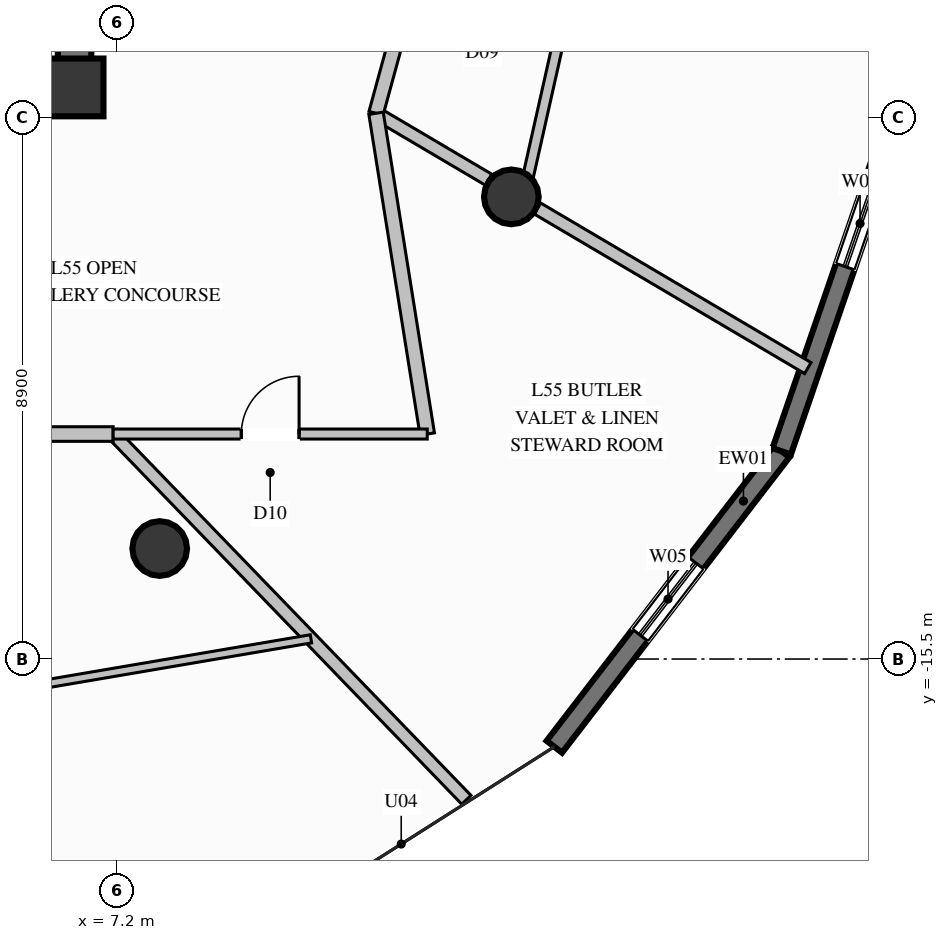
"""IFC4 building model, lengths in metres.
Left out: names, types, materials, properties, quantities, classifications, styles, units other than length and angle.
Written with IfcOpenShell. Run it as: python <this file> out.ifc"""

import sys

from ifc_helpers import new_model, si_unit, direction, frame, frame_2d, origin, origin_2d, place, context, subcontext, project, spatial, rectangle, circle, extrude, element, fill, save


model = new_model("IFC4")
c1 = context("Model", 3, precision=1e-05, world=origin(), true_north=direction((0.0, 1.0)))
c2 = subcontext(c1, "Body", "Model", "MODEL_VIEW")
j1 = project(units=[si_unit("LENGTHUNIT", "METRE"), si_unit("PLANEANGLEUNIT", "RADIAN")], contexts=[c1])
p1 = place(None, origin())
s1 = spatial("IfcSite", under=j1, at=p1, CompositionType="ELEMENT")
p2 = place(p1, origin())
s2 = spatial("IfcBuilding", under=s1, at=p2, CompositionType="ELEMENT")
p3 = place(p2, frame((0.0, 0.0, 212.8)))
s3 = spatial("IfcBuildingStorey", under=s2, at=p3, CompositionType="ELEMENT", Elevation=212.8)
p4 = place(p3, frame((6.5, -6.1, 0.0), z_axis=(0.0, 0.0, 1.0), x_axis=(1.0, 0.0, 0.0)))
e1 = element("IfcColumn", 1, at=p4, inside=s3, PredefinedType="COLUMN", context=c2, shape_type="SweptSolid", body=[
    extrude(rectangle(XDim=0.95, YDim=0.95, at=origin_2d()), origin(), (0.0, 0.0, 1.0), 3.6),
])
p5 = place(p3, frame((4.15, -6.1, 0.0), z_axis=(0.0, 0.0, 1.0), x_axis=(1.0, 0.0, 0.0)))
e2 = element("IfcWall", 2, at=p5, inside=s3, PredefinedType="SHEAR", context=c2, shape_type="SweptSolid", body=[
    extrude(rectangle(XDim=2.075, YDim=0.55, at=frame_2d((1.038, 0.0))), origin(), (0.0, 0.0, 1.0), 3.6),
])
p6 = place(p3, frame((6.5, -6.375, 0.0), z_axis=(0.0, 0.0, 1.0), x_axis=(0.0, 1.0, 0.0)))
e3 = element("IfcWall", 3, at=p6, inside=s3, PredefinedType="SHEAR", context=c2, shape_type="SweptSolid", body=[
    extrude(rectangle(XDim=4.025, YDim=0.55, at=frame_2d((2.012, 0.0))), origin(), (0.0, 0.0, 1.0), 3.6),
])
for number, where, z_axis, x_axis in (
    (4, (7.9, -13.683, 0.0), (0.0, 0.0, 1.0), (1.0, 0.0, 0.0)),
    (5, (13.683, -7.9, 0.0), (0.0, 0.0, 1.0), (1.0, 0.0, 0.0)),
):
    element("IfcColumn", number, at=place(p3, frame(where, z_axis=z_axis, x_axis=x_axis)), inside=s3, PredefinedType="COLUMN", context=c2, shape_type="SweptSolid", body=[
        extrude(circle(Radius=0.45, at=origin_2d()), origin(), (0.0, 0.0, 1.0), 3.6),
    ])
p7 = place(p3, frame((18.13, -12.084, 0.0), z_axis=(0.0, 0.0, 1.0), x_axis=(-0.609935864866, -0.79245078128, 0.0)))
e6 = element("IfcWall", 6, at=p7, inside=s3, PredefinedType="SOLIDWALL", context=c2, shape_type="SweptSolid", body=[
    extrude(rectangle(XDim=6.132, YDim=0.32, at=frame_2d((3.066, 0.0))), origin(), (0.0, 0.0, 1.0), 3.36),
])
p8 = place(p7, frame((2.316, 0.0, 0.85)))
e7 = element("IfcOpeningElement", 7, at=p8, cuts=e6, PredefinedType="OPENING", context=c2, shape_type="SweptSolid", body=[
    extrude(rectangle(XDim=1.5, YDim=1.2, at=frame_2d((0.75, 0.6))), frame((0.0, 0.17, 0.0), z_axis=(0.0, -1.0, 0.0), x_axis=(1.0, 0.0, 0.0)), (0.0, 0.0, 1.0), 0.34),
])
p9 = place(p3, frame((20.208, -6.042, 0.0), z_axis=(0.0, 0.0, 1.0), x_axis=(-0.325246353844, -0.94562931919, 0.0)))
e8 = element("IfcWall", 8, at=p9, inside=s3, PredefinedType="SOLIDWALL", context=c2, shape_type="SweptSolid", body=[
    extrude(rectangle(XDim=6.389, YDim=0.32, at=frame_2d((3.195, 0.0))), origin(), (0.0, 0.0, 1.0), 3.36),
])
p10 = place(p9, frame((1.678, 0.0, 0.85)))
e9 = element("IfcOpeningElement", 9, at=p10, cuts=e8, PredefinedType="OPENING", context=c2, shape_type="SweptSolid", body=[
    extrude(rectangle(XDim=1.5, YDim=1.2, at=frame_2d((0.75, 0.6))), frame((0.0, 0.17, 0.0), z_axis=(0.0, -1.0, 0.0), x_axis=(1.0, 0.0, 0.0)), (0.0, 0.0, 1.0), 0.34),
])
p11 = place(p3, frame((11.458, -6.525, 0.0), z_axis=(0.0, 0.0, 1.0), x_axis=(0.86117076556, -0.508315760669, 0.0)))
e10 = element("IfcWall", 10, at=p11, inside=s3, PredefinedType="PARTITIONING", context=c2, shape_type="SweptSolid", body=[
    extrude(rectangle(XDim=2.148, YDim=0.21, at=frame_2d((1.074, 0.0))), origin(), (0.0, 0.0, 1.0), 2.876),
])
p12 = place(p3, frame((14.112, -8.091, 0.0), z_axis=(0.0, 0.0, 1.0), x_axis=(0.861245459465, -0.508189195626, 0.0)))
e11 = element("IfcWall", 11, at=p12, inside=s3, PredefinedType="PARTITIONING", context=c2, shape_type="SweptSolid", body=[
    extrude(rectangle(XDim=5.164, YDim=0.21, at=frame_2d((2.582, 0.0))), origin(), (0.0, 0.0, 1.0), 3.36),
])
p13 = place(p3, frame((11.458, -6.525, 0.0), z_axis=(0.0, 0.0, 1.0), x_axis=(0.263735174528, 0.964595126318, 0.0)))
e12 = element("IfcWall", 12, at=p13, inside=s3, PredefinedType="PARTITIONING", context=c2, shape_type="SweptSolid", body=[
    extrude(rectangle(XDim=2.775, YDim=0.24, at=frame_2d((1.388, 0.0))), origin(), (0.0, 0.0, 1.0), 3.36),
])
p14 = place(p3, frame((13.872, -7.95, 0.0), z_axis=(0.0, 0.0, 1.0), x_axis=(0.21927837601, 0.975662335962, 0.0)))
e13 = element("IfcWall", 13, at=p14, inside=s3, PredefinedType="PLUMBINGWALL", context=c2, shape_type="SweptSolid", body=[
    extrude(rectangle(XDim=3.379, YDim=0.175, at=frame_2d((1.689, 0.0))), origin(), (0.0, 0.0, 1.0), 2.929),
])
p15 = place(p3, frame((7.134, -11.8, 0.0), z_axis=(0.0, 0.0, 1.0), x_axis=(0.694693504574, -0.71930587006, 0.0)))
e14 = element("IfcWall", 14, at=p15, inside=s3, PredefinedType="PARTITIONING", context=c2, shape_type="SweptSolid", body=[
    extrude(rectangle(XDim=8.362, YDim=0.21, at=frame_2d((4.181, 0.0))), origin(), (0.0, 0.0, 1.0), 3.36),
])
p16 = place(p3, frame((0.0, -11.8, 0.0), z_axis=(0.0, 0.0, 1.0), x_axis=(1.0, 0.0, 0.0)))
e15 = element("IfcWall", 15, at=p16, inside=s3, PredefinedType="PARTITIONING", context=c2, shape_type="SweptSolid", body=[
    extrude(rectangle(XDim=7.134, YDim=0.24, at=frame_2d((3.567, 0.0))), origin(), (0.0, 0.0, 1.0), 3.36),
])
p17 = place(p3, frame((0.245, -16.893, 0.0), z_axis=(0.0, 0.0, 1.0), x_axis=(0.985840040351, 0.167688445755, 0.0)))
e16 = element("IfcWall", 16, at=p17, inside=s3, PredefinedType="PARTITIONING", context=c2, shape_type="SweptSolid", body=[
    extrude(rectangle(XDim=10.288, YDim=0.135, at=frame_2d((5.144, 0.0))), origin(), (0.0, 0.0, 1.0), 3.36),
])
p18 = place(p17, frame((4.669, 0.0, 0.0)))
e17 = element("IfcOpeningElement", 17, at=p18, cuts=e16, PredefinedType="OPENING", context=c2, shape_type="SweptSolid", body=[
    extrude(rectangle(XDim=0.95, YDim=2.1, at=frame_2d((0.475, 1.05))), frame((0.0, 0.078, 0.0), z_axis=(0.0, -1.0, 0.0), x_axis=(1.0, 0.0, 0.0)), (0.0, 0.0, 1.0), 0.155),
])
p19 = place(p3, frame((12.3, -11.8, 0.0), z_axis=(0.0, 0.0, 1.0), x_axis=(-0.157628647668, 0.987498460472, 0.0)))
e18 = element("IfcWall", 18, at=p19, inside=s3, PredefinedType="PARTITIONING", context=c2, shape_type="SweptSolid", body=[
    extrude(rectangle(XDim=5.342, YDim=0.24, at=frame_2d((2.671, 0.0))), origin(), (0.0, 0.0, 1.0), 3.36),
])
p20 = place(p3, frame((7.134, -11.8, 0.0), z_axis=(0.0, 0.0, 1.0), x_axis=(1.0, 0.0, 0.0)))
e19 = element("IfcWall", 19, at=p20, inside=s3, PredefinedType="PARTITIONING", context=c2, shape_type="SweptSolid", body=[
    extrude(rectangle(XDim=5.166, YDim=0.165, at=frame_2d((2.583, 0.0))), origin(), (0.0, 0.0, 1.0), 3.36),
])
p21 = place(p20, frame((2.108, 0.0, 0.0)))
e20 = element("IfcOpeningElement", 20, at=p21, cuts=e19, PredefinedType="OPENING", context=c2, shape_type="SweptSolid", body=[
    extrude(rectangle(XDim=0.95, YDim=2.1, at=frame_2d((0.475, 1.05))), frame((0.0, 0.093, 0.0), z_axis=(0.0, -1.0, 0.0), x_axis=(1.0, 0.0, 0.0)), (0.0, 0.0, 1.0), 0.185),
])
p22 = place(p8, origin())
e21 = element("IfcWindow", 21, at=p22, inside=s3, PartitioningType="SINGLE_PANEL", PredefinedType="WINDOW", context=c2, shape_type="SweptSolid", body=[
    extrude(rectangle(XDim=1.5, YDim=1.2, at=frame_2d((0.75, 0.6))), frame((0.0, 0.03, 0.0), z_axis=(0.0, -1.0, 0.0), x_axis=(1.0, 0.0, 0.0)), (0.0, 0.0, 1.0), 0.06),
])
fill(e7, e21)
p23 = place(p10, origin())
e22 = element("IfcWindow", 22, at=p23, inside=s3, PartitioningType="SINGLE_PANEL", PredefinedType="WINDOW", context=c2, shape_type="SweptSolid", body=[
    extrude(rectangle(XDim=1.5, YDim=1.2, at=frame_2d((0.75, 0.6))), frame((0.0, 0.03, 0.0), z_axis=(0.0, -1.0, 0.0), x_axis=(1.0, 0.0, 0.0)), (0.0, 0.0, 1.0), 0.06),
])
fill(e9, e22)
p24 = place(p21, origin())
e23 = element("IfcDoor", 23, at=p24, inside=s3, OperationType="SINGLE_SWING_RIGHT", PredefinedType="DOOR", context=c2, shape_type="SweptSolid", body=[
    extrude(rectangle(XDim=0.95, YDim=2.1, at=frame_2d((0.475, 1.05))), frame((0.0, 0.025, 0.0), z_axis=(0.0, -1.0, 0.0), x_axis=(1.0, 0.0, 0.0)), (0.0, 0.0, 1.0), 0.05),
])
fill(e20, e23)
save(model, sys.argv[1])
